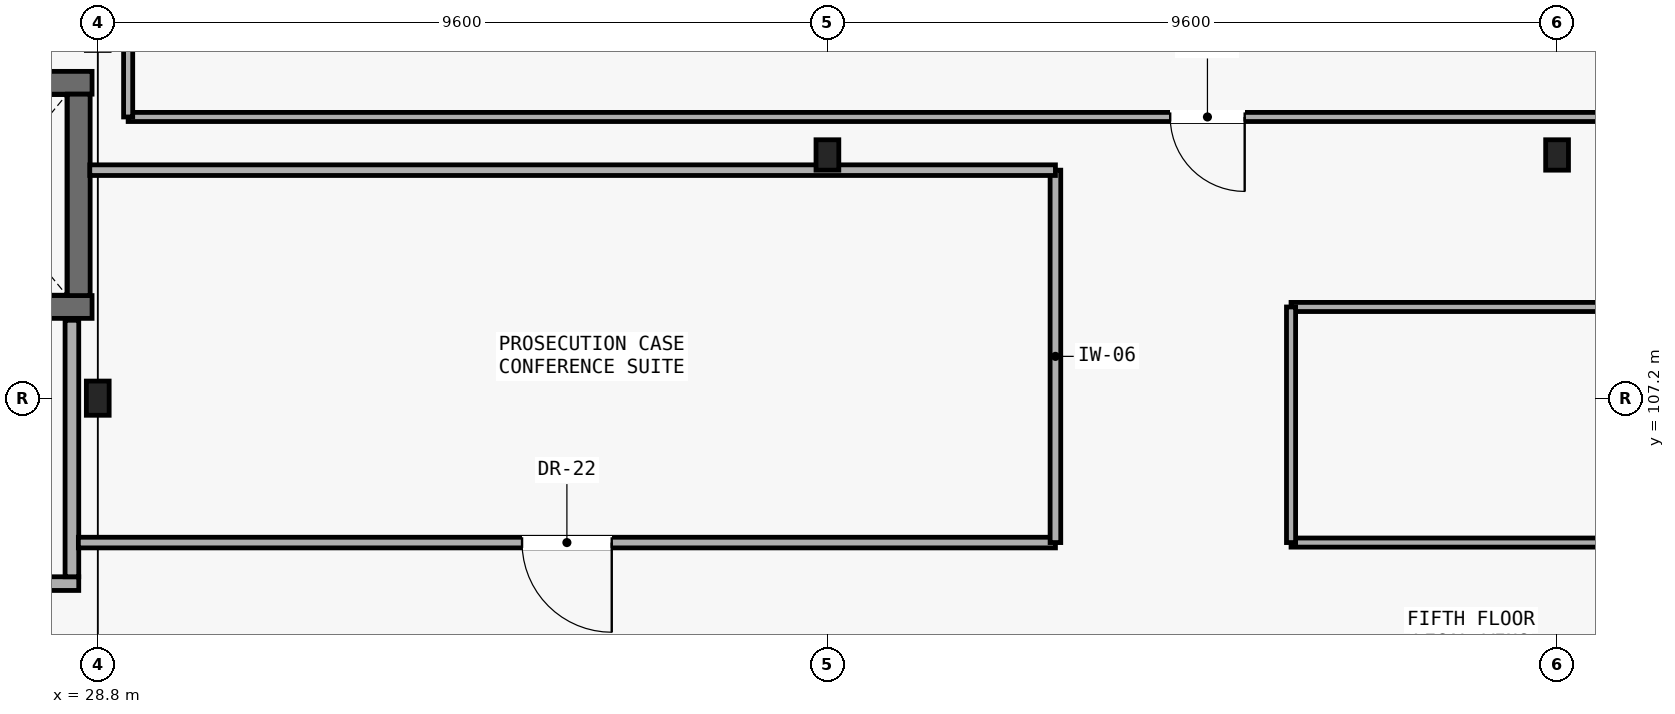
"""IFC4 building model, lengths in metres.
Left out: names, types, materials, properties, quantities, classifications, styles, units other than length and angle.
Written with IfcOpenShell. Run it as: python <this file> out.ifc"""

import sys

from ifc_helpers import new_model, si_unit, direction, frame, frame_2d, origin, origin_2d, place, context, subcontext, project, spatial, rectangle, i_section, extrude, element, fill, save


model = new_model("IFC4")
c1 = context("Model", 3, precision=1e-05, world=origin(), true_north=direction((0.0, 1.0)))
c2 = subcontext(c1, "Body", "Model", "MODEL_VIEW")
j1 = project(units=[si_unit("LENGTHUNIT", "METRE"), si_unit("PLANEANGLEUNIT", "RADIAN")], contexts=[c1])
p1 = place(None, origin())
s1 = spatial("IfcSite", under=j1, at=p1, CompositionType="ELEMENT")
p2 = place(p1, origin())
s2 = spatial("IfcBuilding", under=s1, at=p2, CompositionType="ELEMENT")
p3 = place(p2, frame((0.0, 0.0, 22.05)))
s3 = spatial("IfcBuildingStorey", under=s2, at=p3, CompositionType="ELEMENT", Elevation=22.05)
p4 = place(p3, frame((28.8, 107.2, 0.0), z_axis=(0.0, 0.0, 1.0), x_axis=(1.0, 0.0, 0.0)))
e1 = element("IfcColumn", 1, at=p4, inside=s3, PredefinedType="COLUMN", context=c2, shape_type="SweptSolid", body=[
    extrude(i_section(OverallWidth=0.3, OverallDepth=0.45, WebThickness=0.014, FlangeThickness=0.026, FilletRadius=0.027, at=origin_2d()), origin(), (0.0, 0.0, 1.0), 4.2),
])
for number, where, z_axis, x_axis in (
    (2, (38.4, 110.4, 0.0), (0.0, 0.0, 1.0), (1.0, 0.0, 0.0)),
    (3, (48.0, 110.4, 0.0), (0.0, 0.0, 1.0), (1.0, 0.0, 0.0)),
):
    element("IfcColumn", number, at=place(p3, frame(where, z_axis=z_axis, x_axis=x_axis)), inside=s3, PredefinedType="COLUMN", context=c2, shape_type="SweptSolid", body=[
        extrude(i_section(OverallWidth=0.3, OverallDepth=0.4, WebThickness=0.013, FlangeThickness=0.024, FilletRadius=0.027, at=origin_2d()), origin(), (0.0, 0.0, 1.0), 4.2),
    ])
p5 = place(p3, frame((26.225, 108.4, 0.0), z_axis=(0.0, 0.0, 1.0), x_axis=(1.0, 0.0, 0.0)))
e4 = element("IfcWall", 4, at=p5, inside=s3, PredefinedType="SHEAR", context=c2, shape_type="SweptSolid", body=[
    extrude(rectangle(XDim=2.5, YDim=0.3, at=frame_2d((1.25, 0.0))), origin(), (0.0, 0.0, 1.0), 4.0),
])
p6 = place(p5, frame((0.7, 0.0, 0.0)))
e5 = element("IfcOpeningElement", 5, at=p6, cuts=e4, PredefinedType="OPENING", context=c2, shape_type="SweptSolid", body=[
    extrude(rectangle(XDim=1.1, YDim=2.1, at=frame_2d((0.55, 1.05))), frame((0.0, 0.16, 0.0), z_axis=(0.0, -1.0, 0.0), x_axis=(1.0, 0.0, 0.0)), (0.0, 0.0, 1.0), 0.32),
])
p7 = place(p3, frame((26.225, 111.35, 0.0), z_axis=(0.0, 0.0, 1.0), x_axis=(1.0, 0.0, 0.0)))
e6 = element("IfcWall", 6, at=p7, inside=s3, PredefinedType="SHEAR", context=c2, shape_type="SweptSolid", body=[
    extrude(rectangle(XDim=2.5, YDim=0.3, at=frame_2d((1.25, 0.0))), origin(), (0.0, 0.0, 1.0), 4.0),
])
p8 = place(p3, frame((28.55, 108.55, 0.0), z_axis=(0.0, 0.0, 1.0), x_axis=(0.0, 1.0, 0.0)))
e7 = element("IfcWall", 7, at=p8, inside=s3, PredefinedType="SHEAR", context=c2, shape_type="SweptSolid", body=[
    extrude(rectangle(XDim=2.65, YDim=0.3, at=frame_2d((1.325, 0.0))), origin(), (0.0, 0.0, 1.0), 4.0),
])
p9 = place(p3, frame((20.0, 104.76, 0.0), z_axis=(0.0, 0.0, 1.0), x_axis=(1.0, 0.0, 0.0)))
e8 = element("IfcWall", 8, at=p9, inside=s3, PredefinedType="PARTITIONING", context=c2, shape_type="SweptSolid", body=[
    extrude(rectangle(XDim=8.55, YDim=0.18, at=frame_2d((4.275, 0.0))), origin(), (0.0, 0.0, 1.0), 3.48),
])
p10 = place(p3, frame((28.46, 104.85, 0.0), z_axis=(0.0, 0.0, 1.0), x_axis=(0.0, 1.0, 0.0)))
e9 = element("IfcWall", 9, at=p10, inside=s3, PredefinedType="PARTITIONING", context=c2, shape_type="SweptSolid", body=[
    extrude(rectangle(XDim=3.375, YDim=0.18, at=frame_2d((1.688, 0.0))), origin(), (0.0, 0.0, 1.0), 4.0),
])
p11 = place(p3, frame((29.2, 110.9, 0.0), z_axis=(0.0, 0.0, 1.0), x_axis=(1.0, 0.0, 0.0)))
e10 = element("IfcWall", 10, at=p11, inside=s3, PredefinedType="PARTITIONING", context=c2, shape_type="SweptSolid", body=[
    extrude(rectangle(XDim=28.4, YDim=0.12, at=frame_2d((14.2, 0.0))), origin(), (0.0, 0.0, 1.0), 4.0),
])
p12 = place(p11, frame((13.71, 0.0, 0.0)))
e11 = element("IfcOpeningElement", 11, at=p12, cuts=e10, PredefinedType="OPENING", context=c2, shape_type="SweptSolid", body=[
    extrude(rectangle(XDim=0.98, YDim=2.1, at=frame_2d((0.49, 1.05))), frame((0.0, 0.07, 0.0), z_axis=(0.0, -1.0, 0.0), x_axis=(1.0, 0.0, 0.0)), (0.0, 0.0, 1.0), 0.14),
])
p13 = place(p3, frame((29.2, 116.55, 0.0), z_axis=(0.0, 0.0, 1.0), x_axis=(0.0, -1.0, 0.0)))
e12 = element("IfcWall", 12, at=p13, inside=s3, PredefinedType="PARTITIONING", context=c2, shape_type="SweptSolid", body=[
    extrude(rectangle(XDim=5.65, YDim=0.12, at=frame_2d((2.825, 0.0))), origin(), (0.0, 0.0, 1.0), 4.0),
])
p14 = place(p3, frame((28.545, 105.3, 0.0), z_axis=(0.0, 0.0, 1.0), x_axis=(1.0, 0.0, 0.0)))
e13 = element("IfcWall", 13, at=p14, inside=s3, PredefinedType="PARTITIONING", context=c2, shape_type="SweptSolid", body=[
    extrude(rectangle(XDim=12.855, YDim=0.14, at=frame_2d((6.427, 0.0))), origin(), (0.0, 0.0, 1.0), 3.62),
])
p15 = place(p14, frame((5.837, 0.0, 0.0)))
e14 = element("IfcOpeningElement", 14, at=p15, cuts=e13, PredefinedType="OPENING", context=c2, shape_type="SweptSolid", body=[
    extrude(rectangle(XDim=1.18, YDim=2.1, at=frame_2d((0.59, 1.05))), frame((0.0, 0.08, 0.0), z_axis=(0.0, -1.0, 0.0), x_axis=(1.0, 0.0, 0.0)), (0.0, 0.0, 1.0), 0.16),
])
p16 = place(p3, frame((41.4, 105.3, 0.0), z_axis=(0.0, 0.0, 1.0), x_axis=(0.0, 1.0, 0.0)))
e15 = element("IfcWall", 15, at=p16, inside=s3, PredefinedType="PARTITIONING", context=c2, shape_type="SweptSolid", body=[
    extrude(rectangle(XDim=4.9, YDim=0.14, at=frame_2d((2.45, 0.0))), origin(), (0.0, 0.0, 1.0), 4.0),
])
p17 = place(p3, frame((41.4, 110.2, 0.0), z_axis=(0.0, 0.0, 1.0), x_axis=(-1.0, 0.0, 0.0)))
e16 = element("IfcWall", 16, at=p17, inside=s3, PredefinedType="PARTITIONING", context=c2, shape_type="SweptSolid", body=[
    extrude(rectangle(XDim=12.705, YDim=0.14, at=frame_2d((6.353, 0.0))), origin(), (0.0, 0.0, 1.0), 3.44),
])
p18 = place(p3, frame((44.5, 105.3, 0.0), z_axis=(0.0, 0.0, 1.0), x_axis=(1.0, 0.0, 0.0)))
e17 = element("IfcWall", 17, at=p18, inside=s3, PredefinedType="PARTITIONING", context=c2, shape_type="SweptSolid", body=[
    extrude(rectangle(XDim=11.1, YDim=0.12, at=frame_2d((5.55, 0.0))), origin(), (0.0, 0.0, 1.0), 3.62),
])
p19 = place(p18, frame((5.04, 0.0, 0.0)))
e18 = element("IfcOpeningElement", 18, at=p19, cuts=e17, PredefinedType="OPENING", context=c2, shape_type="SweptSolid", body=[
    extrude(rectangle(XDim=1.02, YDim=2.1, at=frame_2d((0.51, 1.05))), frame((0.0, 0.07, 0.0), z_axis=(0.0, -1.0, 0.0), x_axis=(1.0, 0.0, 0.0)), (0.0, 0.0, 1.0), 0.14),
])
p20 = place(p3, frame((55.6, 108.4, 0.0), z_axis=(0.0, 0.0, 1.0), x_axis=(-1.0, 0.0, 0.0)))
e19 = element("IfcWall", 19, at=p20, inside=s3, PredefinedType="PARTITIONING", context=c2, shape_type="SweptSolid", body=[
    extrude(rectangle(XDim=11.1, YDim=0.12, at=frame_2d((5.55, 0.0))), origin(), (0.0, 0.0, 1.0), 4.0),
])
p21 = place(p3, frame((44.5, 108.4, 0.0), z_axis=(0.0, 0.0, 1.0), x_axis=(0.0, -1.0, 0.0)))
e20 = element("IfcWall", 20, at=p21, inside=s3, PredefinedType="PARTITIONING", context=c2, shape_type="SweptSolid", body=[
    extrude(rectangle(XDim=3.1, YDim=0.12, at=frame_2d((1.55, 0.0))), origin(), (0.0, 0.0, 1.0), 4.0),
])
p22 = place(p12, frame((0.98, 0.0, 0.0), z_axis=(0.0, 0.0, 1.0), x_axis=(-1.0, 0.0, 0.0)))
e21 = element("IfcDoor", 21, at=p22, inside=s3, OperationType="SINGLE_SWING_RIGHT", PredefinedType="DOOR", context=c2, shape_type="SweptSolid", body=[
    extrude(rectangle(XDim=0.98, YDim=2.1, at=frame_2d((0.49, 1.05))), frame((0.0, 0.025, 0.0), z_axis=(0.0, -1.0, 0.0), x_axis=(1.0, 0.0, 0.0)), (0.0, 0.0, 1.0), 0.05),
])
fill(e11, e21)
p23 = place(p15, frame((1.18, 0.0, 0.0), z_axis=(0.0, 0.0, 1.0), x_axis=(-1.0, 0.0, 0.0)))
e22 = element("IfcDoor", 22, at=p23, inside=s3, OperationType="SINGLE_SWING_RIGHT", PredefinedType="DOOR", context=c2, shape_type="SweptSolid", body=[
    extrude(rectangle(XDim=1.18, YDim=2.1, at=frame_2d((0.59, 1.05))), frame((0.0, 0.025, 0.0), z_axis=(0.0, -1.0, 0.0), x_axis=(1.0, 0.0, 0.0)), (0.0, 0.0, 1.0), 0.05),
])
fill(e14, e22)
save(model, sys.argv[1])
